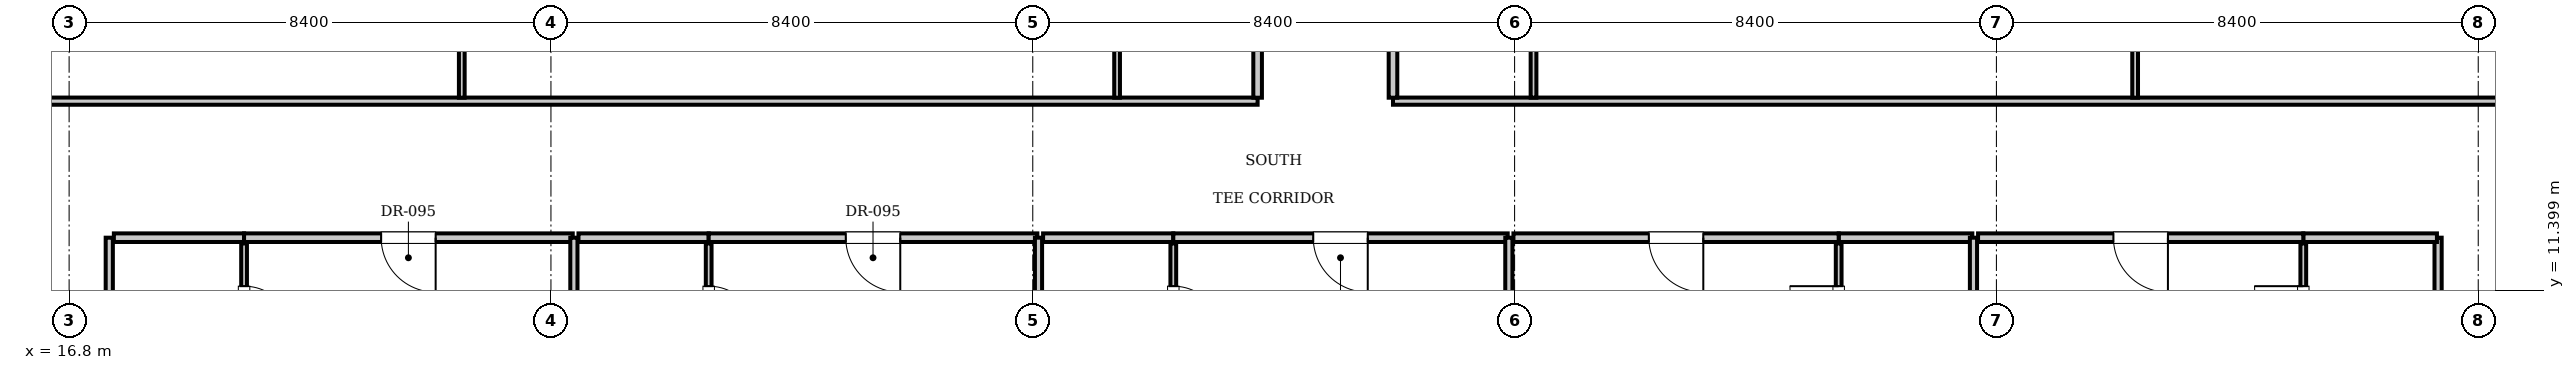
"""IFC4 building model, lengths in metres.
Left out: names, types, materials, properties, quantities, classifications, styles, units other than length and angle.
Written with IfcOpenShell. Run it as: python <this file> out.ifc"""

import sys

from ifc_helpers import new_model, si_unit, direction, frame, frame_2d, origin, place, context, subcontext, project, spatial, rectangle, extrude, element, fill, save


model = new_model("IFC4")
c1 = context("Model", 3, precision=1e-05, world=origin(), true_north=direction((0.0, 1.0)))
c2 = subcontext(c1, "Body", "Model", "MODEL_VIEW")
j1 = project(units=[si_unit("LENGTHUNIT", "METRE"), si_unit("PLANEANGLEUNIT", "RADIAN")], contexts=[c1])
p1 = place(None, origin())
s1 = spatial("IfcSite", under=j1, at=p1, CompositionType="ELEMENT")
p2 = place(p1, origin())
s2 = spatial("IfcBuilding", under=s1, at=p2, CompositionType="ELEMENT")
p3 = place(p2, frame((0.0, 0.0, 177.45)))
s3 = spatial("IfcBuildingStorey", under=s2, at=p3, CompositionType="ELEMENT", Elevation=177.45)
for number, where, z_axis, x_axis in (
    (1, (17.5, 9.0, 0.0), (0.0, 0.0, 1.0), (0.0, 1.0, 0.0)),
    (2, (58.1, 9.0, 0.0), (0.0, 0.0, 1.0), (0.0, 1.0, 0.0)),
):
    element("IfcWall", number, at=place(p3, frame(where, z_axis=z_axis, x_axis=x_axis)), inside=s3, PredefinedType="PARTITIONING", context=c2, shape_type="SweptSolid", body=[
        extrude(rectangle(XDim=3.32, YDim=0.125, at=frame_2d((1.66, 0.0))), origin(), (0.0, 0.0, 1.0), 3.61),
    ])
p4 = place(p3, frame((17.58, 12.32, 0.0), z_axis=(0.0, 0.0, 1.0), x_axis=(1.0, 0.0, 0.0)))
e3 = element("IfcWall", 3, at=p4, inside=s3, PredefinedType="PARTITIONING", context=c2, shape_type="SweptSolid", body=[
    extrude(rectangle(XDim=2.27, YDim=0.15, at=frame_2d((1.135, 0.0))), origin(), (0.0, 0.0, 1.0), 3.61),
])
p5 = place(p3, frame((19.85, 9.88, 0.0), z_axis=(0.0, 0.0, 1.0), x_axis=(0.0, 1.0, 0.0)))
e4 = element("IfcWall", 4, at=p5, inside=s3, PredefinedType="PARTITIONING", context=c2, shape_type="SweptSolid", body=[
    extrude(rectangle(XDim=2.34, YDim=0.1, at=frame_2d((1.17, 0.0))), origin(), (0.0, 0.0, 1.0), 3.61),
])
p6 = place(p5, frame((0.745, 0.0, 0.0)))
e5 = element("IfcOpeningElement", 5, at=p6, cuts=e4, PredefinedType="OPENING", context=c2, shape_type="SweptSolid", body=[
    extrude(rectangle(XDim=0.85, YDim=2.1, at=frame_2d((0.425, 1.05))), frame((0.0, 0.06, 0.0), z_axis=(0.0, -1.0, 0.0), x_axis=(1.0, 0.0, 0.0)), (0.0, 0.0, 1.0), 0.12),
])
p7 = place(p3, frame((19.85, 12.32, 0.0), z_axis=(0.0, 0.0, 1.0), x_axis=(1.0, 0.0, 0.0)))
e6 = element("IfcWall", 6, at=p7, inside=s3, PredefinedType="PARTITIONING", context=c2, shape_type="SweptSolid", body=[
    extrude(rectangle(XDim=5.73, YDim=0.15, at=frame_2d((2.865, 0.0))), origin(), (0.0, 0.0, 1.0), 3.61),
])
p8 = place(p7, frame((2.39, 0.0, 0.0)))
e7 = element("IfcOpeningElement", 7, at=p8, cuts=e6, PredefinedType="OPENING", context=c2, shape_type="SweptSolid", body=[
    extrude(rectangle(XDim=0.95, YDim=2.15, at=frame_2d((0.475, 1.075))), frame((0.0, 0.085, 0.0), z_axis=(0.0, -1.0, 0.0), x_axis=(1.0, 0.0, 0.0)), (0.0, 0.0, 1.0), 0.17),
])
p9 = place(p3, frame((25.6, 4.7, 0.0), z_axis=(0.0, 0.0, 1.0), x_axis=(0.0, 1.0, 0.0)))
e8 = element("IfcWall", 8, at=p9, inside=s3, PredefinedType="PARTITIONING", context=c2, shape_type="SweptSolid", body=[
    extrude(rectangle(XDim=7.62, YDim=0.125, at=frame_2d((3.81, 0.0))), origin(), (0.0, 0.0, 1.0), 3.61),
])
p10 = place(p3, frame((25.68, 12.32, 0.0), z_axis=(0.0, 0.0, 1.0), x_axis=(1.0, 0.0, 0.0)))
e9 = element("IfcWall", 9, at=p10, inside=s3, PredefinedType="PARTITIONING", context=c2, shape_type="SweptSolid", body=[
    extrude(rectangle(XDim=2.27, YDim=0.15, at=frame_2d((1.135, 0.0))), origin(), (0.0, 0.0, 1.0), 3.61),
])
p11 = place(p3, frame((27.95, 9.88, 0.0), z_axis=(0.0, 0.0, 1.0), x_axis=(0.0, 1.0, 0.0)))
e10 = element("IfcWall", 10, at=p11, inside=s3, PredefinedType="PARTITIONING", context=c2, shape_type="SweptSolid", body=[
    extrude(rectangle(XDim=2.34, YDim=0.1, at=frame_2d((1.17, 0.0))), origin(), (0.0, 0.0, 1.0), 3.61),
])
p12 = place(p11, frame((0.745, 0.0, 0.0)))
e11 = element("IfcOpeningElement", 11, at=p12, cuts=e10, PredefinedType="OPENING", context=c2, shape_type="SweptSolid", body=[
    extrude(rectangle(XDim=0.85, YDim=2.1, at=frame_2d((0.425, 1.05))), frame((0.0, 0.06, 0.0), z_axis=(0.0, -1.0, 0.0), x_axis=(1.0, 0.0, 0.0)), (0.0, 0.0, 1.0), 0.12),
])
p13 = place(p3, frame((27.95, 12.32, 0.0), z_axis=(0.0, 0.0, 1.0), x_axis=(1.0, 0.0, 0.0)))
e12 = element("IfcWall", 12, at=p13, inside=s3, PredefinedType="PARTITIONING", context=c2, shape_type="SweptSolid", body=[
    extrude(rectangle(XDim=5.73, YDim=0.15, at=frame_2d((2.865, 0.0))), origin(), (0.0, 0.0, 1.0), 3.61),
])
p14 = place(p13, frame((2.39, 0.0, 0.0)))
e13 = element("IfcOpeningElement", 13, at=p14, cuts=e12, PredefinedType="OPENING", context=c2, shape_type="SweptSolid", body=[
    extrude(rectangle(XDim=0.95, YDim=2.15, at=frame_2d((0.475, 1.075))), frame((0.0, 0.085, 0.0), z_axis=(0.0, -1.0, 0.0), x_axis=(1.0, 0.0, 0.0)), (0.0, 0.0, 1.0), 0.17),
])
p15 = place(p3, frame((33.7, 4.7, 0.0), z_axis=(0.0, 0.0, 1.0), x_axis=(0.0, 1.0, 0.0)))
e14 = element("IfcWall", 14, at=p15, inside=s3, PredefinedType="PARTITIONING", context=c2, shape_type="SweptSolid", body=[
    extrude(rectangle(XDim=7.62, YDim=0.125, at=frame_2d((3.81, 0.0))), origin(), (0.0, 0.0, 1.0), 3.007),
])
p16 = place(p3, frame((33.78, 12.32, 0.0), z_axis=(0.0, 0.0, 1.0), x_axis=(1.0, 0.0, 0.0)))
e15 = element("IfcWall", 15, at=p16, inside=s3, PredefinedType="PARTITIONING", context=c2, shape_type="SweptSolid", body=[
    extrude(rectangle(XDim=2.27, YDim=0.15, at=frame_2d((1.135, 0.0))), origin(), (0.0, 0.0, 1.0), 3.61),
])
p17 = place(p3, frame((36.05, 9.88, 0.0), z_axis=(0.0, 0.0, 1.0), x_axis=(0.0, 1.0, 0.0)))
e16 = element("IfcWall", 16, at=p17, inside=s3, PredefinedType="PARTITIONING", context=c2, shape_type="SweptSolid", body=[
    extrude(rectangle(XDim=2.34, YDim=0.1, at=frame_2d((1.17, 0.0))), origin(), (0.0, 0.0, 1.0), 3.61),
])
p18 = place(p17, frame((0.745, 0.0, 0.0)))
e17 = element("IfcOpeningElement", 17, at=p18, cuts=e16, PredefinedType="OPENING", context=c2, shape_type="SweptSolid", body=[
    extrude(rectangle(XDim=0.85, YDim=2.1, at=frame_2d((0.425, 1.05))), frame((0.0, 0.06, 0.0), z_axis=(0.0, -1.0, 0.0), x_axis=(1.0, 0.0, 0.0)), (0.0, 0.0, 1.0), 0.12),
])
p19 = place(p3, frame((36.05, 12.32, 0.0), z_axis=(0.0, 0.0, 1.0), x_axis=(1.0, 0.0, 0.0)))
e18 = element("IfcWall", 18, at=p19, inside=s3, PredefinedType="PARTITIONING", context=c2, shape_type="SweptSolid", body=[
    extrude(rectangle(XDim=5.83, YDim=0.15, at=frame_2d((2.915, 0.0))), origin(), (0.0, 0.0, 1.0), 3.61),
])
p20 = place(p19, frame((2.44, 0.0, 0.0)))
e19 = element("IfcOpeningElement", 19, at=p20, cuts=e18, PredefinedType="OPENING", context=c2, shape_type="SweptSolid", body=[
    extrude(rectangle(XDim=0.95, YDim=2.15, at=frame_2d((0.475, 1.075))), frame((0.0, 0.085, 0.0), z_axis=(0.0, -1.0, 0.0), x_axis=(1.0, 0.0, 0.0)), (0.0, 0.0, 1.0), 0.17),
])
p21 = place(p3, frame((41.9, 4.7, 0.0), z_axis=(0.0, 0.0, 1.0), x_axis=(0.0, 1.0, 0.0)))
e20 = element("IfcWall", 20, at=p21, inside=s3, PredefinedType="PARTITIONING", context=c2, shape_type="SweptSolid", body=[
    extrude(rectangle(XDim=7.62, YDim=0.125, at=frame_2d((3.81, 0.0))), origin(), (0.0, 0.0, 1.0), 3.007),
])
p22 = place(p3, frame((47.65, 12.32, 0.0), z_axis=(0.0, 0.0, 1.0), x_axis=(1.0, 0.0, 0.0)))
e21 = element("IfcWall", 21, at=p22, inside=s3, PredefinedType="PARTITIONING", context=c2, shape_type="SweptSolid", body=[
    extrude(rectangle(XDim=2.33, YDim=0.15, at=frame_2d((1.165, 0.0))), origin(), (0.0, 0.0, 1.0), 3.61),
])
p23 = place(p3, frame((47.65, 9.88, 0.0), z_axis=(0.0, 0.0, 1.0), x_axis=(0.0, 1.0, 0.0)))
e22 = element("IfcWall", 22, at=p23, inside=s3, PredefinedType="PARTITIONING", context=c2, shape_type="SweptSolid", body=[
    extrude(rectangle(XDim=2.34, YDim=0.1, at=frame_2d((1.17, 0.0))), origin(), (0.0, 0.0, 1.0), 3.61),
])
p24 = place(p23, frame((0.745, 0.0, 0.0)))
e23 = element("IfcOpeningElement", 23, at=p24, cuts=e22, PredefinedType="OPENING", context=c2, shape_type="SweptSolid", body=[
    extrude(rectangle(XDim=0.85, YDim=2.1, at=frame_2d((0.425, 1.05))), frame((0.0, 0.06, 0.0), z_axis=(0.0, -1.0, 0.0), x_axis=(1.0, 0.0, 0.0)), (0.0, 0.0, 1.0), 0.12),
])
p25 = place(p3, frame((41.98, 12.32, 0.0), z_axis=(0.0, 0.0, 1.0), x_axis=(1.0, 0.0, 0.0)))
e24 = element("IfcWall", 24, at=p25, inside=s3, PredefinedType="PARTITIONING", context=c2, shape_type="SweptSolid", body=[
    extrude(rectangle(XDim=5.67, YDim=0.15, at=frame_2d((2.835, 0.0))), origin(), (0.0, 0.0, 1.0), 3.61),
])
p26 = place(p25, frame((2.36, 0.0, 0.0)))
e25 = element("IfcOpeningElement", 25, at=p26, cuts=e24, PredefinedType="OPENING", context=c2, shape_type="SweptSolid", body=[
    extrude(rectangle(XDim=0.95, YDim=2.15, at=frame_2d((0.475, 1.075))), frame((0.0, 0.085, 0.0), z_axis=(0.0, -1.0, 0.0), x_axis=(1.0, 0.0, 0.0)), (0.0, 0.0, 1.0), 0.17),
])
p27 = place(p3, frame((50.0, 4.7, 0.0), z_axis=(0.0, 0.0, 1.0), x_axis=(0.0, 1.0, 0.0)))
e26 = element("IfcWall", 26, at=p27, inside=s3, PredefinedType="PARTITIONING", context=c2, shape_type="SweptSolid", body=[
    extrude(rectangle(XDim=7.62, YDim=0.125, at=frame_2d((3.81, 0.0))), origin(), (0.0, 0.0, 1.0), 3.61),
])
p28 = place(p3, frame((55.75, 12.32, 0.0), z_axis=(0.0, 0.0, 1.0), x_axis=(1.0, 0.0, 0.0)))
e27 = element("IfcWall", 27, at=p28, inside=s3, PredefinedType="PARTITIONING", context=c2, shape_type="SweptSolid", body=[
    extrude(rectangle(XDim=2.33, YDim=0.15, at=frame_2d((1.165, 0.0))), origin(), (0.0, 0.0, 1.0), 3.61),
])
p29 = place(p3, frame((55.75, 9.88, 0.0), z_axis=(0.0, 0.0, 1.0), x_axis=(0.0, 1.0, 0.0)))
e28 = element("IfcWall", 28, at=p29, inside=s3, PredefinedType="PARTITIONING", context=c2, shape_type="SweptSolid", body=[
    extrude(rectangle(XDim=2.34, YDim=0.1, at=frame_2d((1.17, 0.0))), origin(), (0.0, 0.0, 1.0), 3.61),
])
p30 = place(p29, frame((0.745, 0.0, 0.0)))
e29 = element("IfcOpeningElement", 29, at=p30, cuts=e28, PredefinedType="OPENING", context=c2, shape_type="SweptSolid", body=[
    extrude(rectangle(XDim=0.85, YDim=2.1, at=frame_2d((0.425, 1.05))), frame((0.0, 0.06, 0.0), z_axis=(0.0, -1.0, 0.0), x_axis=(1.0, 0.0, 0.0)), (0.0, 0.0, 1.0), 0.12),
])
p31 = place(p3, frame((50.08, 12.32, 0.0), z_axis=(0.0, 0.0, 1.0), x_axis=(1.0, 0.0, 0.0)))
e30 = element("IfcWall", 30, at=p31, inside=s3, PredefinedType="PARTITIONING", context=c2, shape_type="SweptSolid", body=[
    extrude(rectangle(XDim=5.67, YDim=0.15, at=frame_2d((2.835, 0.0))), origin(), (0.0, 0.0, 1.0), 3.61),
])
p32 = place(p31, frame((2.36, 0.0, 0.0)))
e31 = element("IfcOpeningElement", 31, at=p32, cuts=e30, PredefinedType="OPENING", context=c2, shape_type="SweptSolid", body=[
    extrude(rectangle(XDim=0.95, YDim=2.15, at=frame_2d((0.475, 1.075))), frame((0.0, 0.085, 0.0), z_axis=(0.0, -1.0, 0.0), x_axis=(1.0, 0.0, 0.0)), (0.0, 0.0, 1.0), 0.17),
])
p33 = place(p3, frame((13.2, 14.7, 0.0), z_axis=(0.0, 0.0, 1.0), x_axis=(1.0, 0.0, 0.0)))
e32 = element("IfcWall", 32, at=p33, inside=s3, PredefinedType="PARTITIONING", context=c2, shape_type="SweptSolid", body=[
    extrude(rectangle(XDim=24.32, YDim=0.125, at=frame_2d((12.16, 0.0))), origin(), (0.0, 0.0, 1.0), 3.61),
])
p34 = place(p3, frame((39.88, 14.7, 0.0), z_axis=(0.0, 0.0, 1.0), x_axis=(1.0, 0.0, 0.0)))
e33 = element("IfcWall", 33, at=p34, inside=s3, PredefinedType="PARTITIONING", context=c2, shape_type="SweptSolid", body=[
    extrude(rectangle(XDim=22.52, YDim=0.125, at=frame_2d((11.26, 0.0))), origin(), (0.0, 0.0, 1.0), 3.61),
])
p35 = place(p3, frame((37.52, 14.76, 0.0), z_axis=(0.0, 0.0, 1.0), x_axis=(0.0, 1.0, 0.0)))
e34 = element("IfcWall", 34, at=p35, inside=s3, PredefinedType="PARTITIONING", context=c2, shape_type="SweptSolid", body=[
    extrude(rectangle(XDim=1.89, YDim=0.15, at=frame_2d((0.945, 0.0))), origin(), (0.0, 0.0, 1.0), 3.61),
])
p36 = place(p3, frame((35.07, 14.76, 0.0), z_axis=(0.0, 0.0, 1.0), x_axis=(0.0, 1.0, 0.0)))
e35 = element("IfcWall", 35, at=p36, inside=s3, PredefinedType="PARTITIONING", context=c2, shape_type="SweptSolid", body=[
    extrude(rectangle(XDim=1.89, YDim=0.1, at=frame_2d((0.945, 0.0))), origin(), (0.0, 0.0, 1.0), 3.61),
])
p37 = place(p3, frame((23.646, 14.76, 0.0), z_axis=(0.0, 0.0, 1.0), x_axis=(0.0, 1.0, 0.0)))
e36 = element("IfcWall", 36, at=p37, inside=s3, PredefinedType="PARTITIONING", context=c2, shape_type="SweptSolid", body=[
    extrude(rectangle(XDim=3.98, YDim=0.1, at=frame_2d((1.99, 0.0))), origin(), (0.0, 0.0, 1.0), 3.61),
])
p38 = place(p37, frame((1.54, 0.0, 0.0)))
e37 = element("IfcOpeningElement", 37, at=p38, cuts=e36, PredefinedType="OPENING", context=c2, shape_type="SweptSolid", body=[
    extrude(rectangle(XDim=0.9, YDim=2.1, at=frame_2d((0.45, 1.05))), frame((0.0, 0.06, 0.0), z_axis=(0.0, -1.0, 0.0), x_axis=(1.0, 0.0, 0.0)), (0.0, 0.0, 1.0), 0.12),
])
p39 = place(p3, frame((39.88, 14.76, 0.0), z_axis=(0.0, 0.0, 1.0), x_axis=(0.0, 1.0, 0.0)))
e38 = element("IfcWall", 38, at=p39, inside=s3, PredefinedType="PARTITIONING", context=c2, shape_type="SweptSolid", body=[
    extrude(rectangle(XDim=1.89, YDim=0.15, at=frame_2d((0.945, 0.0))), origin(), (0.0, 0.0, 1.0), 3.61),
])
p40 = place(p3, frame((42.33, 14.76, 0.0), z_axis=(0.0, 0.0, 1.0), x_axis=(0.0, 1.0, 0.0)))
e39 = element("IfcWall", 39, at=p40, inside=s3, PredefinedType="PARTITIONING", context=c2, shape_type="SweptSolid", body=[
    extrude(rectangle(XDim=1.89, YDim=0.1, at=frame_2d((0.945, 0.0))), origin(), (0.0, 0.0, 1.0), 3.61),
])
p41 = place(p3, frame((52.818, 14.76, 0.0), z_axis=(0.0, 0.0, 1.0), x_axis=(0.0, 1.0, 0.0)))
e40 = element("IfcWall", 40, at=p41, inside=s3, PredefinedType="PARTITIONING", context=c2, shape_type="SweptSolid", body=[
    extrude(rectangle(XDim=3.98, YDim=0.1, at=frame_2d((1.99, 0.0))), origin(), (0.0, 0.0, 1.0), 3.61),
])
p42 = place(p41, frame((1.54, 0.0, 0.0)))
e41 = element("IfcOpeningElement", 41, at=p42, cuts=e40, PredefinedType="OPENING", context=c2, shape_type="SweptSolid", body=[
    extrude(rectangle(XDim=0.9, YDim=2.1, at=frame_2d((0.45, 1.05))), frame((0.0, 0.06, 0.0), z_axis=(0.0, -1.0, 0.0), x_axis=(1.0, 0.0, 0.0)), (0.0, 0.0, 1.0), 0.12),
])
p43 = place(p6, frame((0.85, 0.0, 0.0), z_axis=(0.0, 0.0, 1.0), x_axis=(-1.0, 0.0, 0.0)))
e42 = element("IfcDoor", 42, at=p43, inside=s3, OperationType="SINGLE_SWING_RIGHT", PredefinedType="DOOR", context=c2, shape_type="SweptSolid", body=[
    extrude(rectangle(XDim=0.85, YDim=2.1, at=frame_2d((0.425, 1.05))), frame((0.0, 0.025, 0.0), z_axis=(0.0, -1.0, 0.0), x_axis=(1.0, 0.0, 0.0)), (0.0, 0.0, 1.0), 0.05),
])
fill(e5, e42)
p44 = place(p8, frame((0.95, 0.0, 0.0), z_axis=(0.0, 0.0, 1.0), x_axis=(-1.0, 0.0, 0.0)))
e43 = element("IfcDoor", 43, at=p44, inside=s3, OperationType="SINGLE_SWING_LEFT", PredefinedType="DOOR", context=c2, shape_type="SweptSolid", body=[
    extrude(rectangle(XDim=0.95, YDim=2.15, at=frame_2d((0.475, 1.075))), frame((0.0, 0.025, 0.0), z_axis=(0.0, -1.0, 0.0), x_axis=(1.0, 0.0, 0.0)), (0.0, 0.0, 1.0), 0.05),
])
fill(e7, e43)
p45 = place(p12, frame((0.85, 0.0, 0.0), z_axis=(0.0, 0.0, 1.0), x_axis=(-1.0, 0.0, 0.0)))
e44 = element("IfcDoor", 44, at=p45, inside=s3, OperationType="SINGLE_SWING_RIGHT", PredefinedType="DOOR", context=c2, shape_type="SweptSolid", body=[
    extrude(rectangle(XDim=0.85, YDim=2.1, at=frame_2d((0.425, 1.05))), frame((0.0, 0.025, 0.0), z_axis=(0.0, -1.0, 0.0), x_axis=(1.0, 0.0, 0.0)), (0.0, 0.0, 1.0), 0.05),
])
fill(e11, e44)
p46 = place(p14, frame((0.95, 0.0, 0.0), z_axis=(0.0, 0.0, 1.0), x_axis=(-1.0, 0.0, 0.0)))
e45 = element("IfcDoor", 45, at=p46, inside=s3, OperationType="SINGLE_SWING_LEFT", PredefinedType="DOOR", context=c2, shape_type="SweptSolid", body=[
    extrude(rectangle(XDim=0.95, YDim=2.15, at=frame_2d((0.475, 1.075))), frame((0.0, 0.025, 0.0), z_axis=(0.0, -1.0, 0.0), x_axis=(1.0, 0.0, 0.0)), (0.0, 0.0, 1.0), 0.05),
])
fill(e13, e45)
p47 = place(p18, frame((0.85, 0.0, 0.0), z_axis=(0.0, 0.0, 1.0), x_axis=(-1.0, 0.0, 0.0)))
e46 = element("IfcDoor", 46, at=p47, inside=s3, OperationType="SINGLE_SWING_RIGHT", PredefinedType="DOOR", context=c2, shape_type="SweptSolid", body=[
    extrude(rectangle(XDim=0.85, YDim=2.1, at=frame_2d((0.425, 1.05))), frame((0.0, 0.025, 0.0), z_axis=(0.0, -1.0, 0.0), x_axis=(1.0, 0.0, 0.0)), (0.0, 0.0, 1.0), 0.05),
])
fill(e17, e46)
p48 = place(p20, frame((0.95, 0.0, 0.0), z_axis=(0.0, 0.0, 1.0), x_axis=(-1.0, 0.0, 0.0)))
e47 = element("IfcDoor", 47, at=p48, inside=s3, OperationType="SINGLE_SWING_LEFT", PredefinedType="DOOR", context=c2, shape_type="SweptSolid", body=[
    extrude(rectangle(XDim=0.95, YDim=2.15, at=frame_2d((0.475, 1.075))), frame((0.0, 0.025, 0.0), z_axis=(0.0, -1.0, 0.0), x_axis=(1.0, 0.0, 0.0)), (0.0, 0.0, 1.0), 0.05),
])
fill(e19, e47)
p49 = place(p24, origin())
e48 = element("IfcDoor", 48, at=p49, inside=s3, OperationType="SINGLE_SWING_RIGHT", PredefinedType="DOOR", context=c2, shape_type="SweptSolid", body=[
    extrude(rectangle(XDim=0.85, YDim=2.1, at=frame_2d((0.425, 1.05))), frame((0.0, 0.025, 0.0), z_axis=(0.0, -1.0, 0.0), x_axis=(1.0, 0.0, 0.0)), (0.0, 0.0, 1.0), 0.05),
])
fill(e23, e48)
p50 = place(p26, frame((0.95, 0.0, 0.0), z_axis=(0.0, 0.0, 1.0), x_axis=(-1.0, 0.0, 0.0)))
e49 = element("IfcDoor", 49, at=p50, inside=s3, OperationType="SINGLE_SWING_LEFT", PredefinedType="DOOR", context=c2, shape_type="SweptSolid", body=[
    extrude(rectangle(XDim=0.95, YDim=2.15, at=frame_2d((0.475, 1.075))), frame((0.0, 0.025, 0.0), z_axis=(0.0, -1.0, 0.0), x_axis=(1.0, 0.0, 0.0)), (0.0, 0.0, 1.0), 0.05),
])
fill(e25, e49)
p51 = place(p30, origin())
e50 = element("IfcDoor", 50, at=p51, inside=s3, OperationType="SINGLE_SWING_RIGHT", PredefinedType="DOOR", context=c2, shape_type="SweptSolid", body=[
    extrude(rectangle(XDim=0.85, YDim=2.1, at=frame_2d((0.425, 1.05))), frame((0.0, 0.025, 0.0), z_axis=(0.0, -1.0, 0.0), x_axis=(1.0, 0.0, 0.0)), (0.0, 0.0, 1.0), 0.05),
])
fill(e29, e50)
p52 = place(p32, frame((0.95, 0.0, 0.0), z_axis=(0.0, 0.0, 1.0), x_axis=(-1.0, 0.0, 0.0)))
e51 = element("IfcDoor", 51, at=p52, inside=s3, OperationType="SINGLE_SWING_LEFT", PredefinedType="DOOR", context=c2, shape_type="SweptSolid", body=[
    extrude(rectangle(XDim=0.95, YDim=2.15, at=frame_2d((0.475, 1.075))), frame((0.0, 0.025, 0.0), z_axis=(0.0, -1.0, 0.0), x_axis=(1.0, 0.0, 0.0)), (0.0, 0.0, 1.0), 0.05),
])
fill(e31, e51)
save(model, sys.argv[1])
